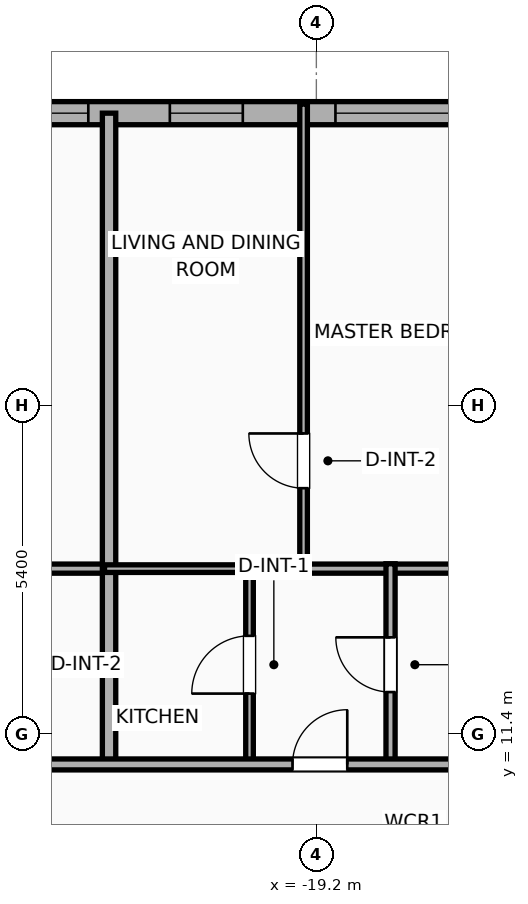
"""IFC4 building model, lengths in metres.
Left out: names, types, materials, properties, quantities, classifications, styles, units other than length and angle.
Written with IfcOpenShell. Run it as: python <this file> out.ifc"""

import sys

from ifc_helpers import new_model, si_unit, direction, frame, frame_2d, origin, place, context, subcontext, project, spatial, rectangle, extrude, element, fill, save


model = new_model("IFC4")
c1 = context("Model", 3, precision=1e-05, world=origin(), true_north=direction((0.0, 1.0)))
c2 = subcontext(c1, "Body", "Model", "MODEL_VIEW")
j1 = project(units=[si_unit("LENGTHUNIT", "METRE"), si_unit("PLANEANGLEUNIT", "RADIAN")], contexts=[c1])
p1 = place(None, origin())
s1 = spatial("IfcSite", under=j1, at=p1, CompositionType="ELEMENT")
p2 = place(p1, origin())
s2 = spatial("IfcBuilding", under=s1, at=p2, CompositionType="ELEMENT")
p3 = place(p2, frame((0.0, 0.0, 89.7)))
s3 = spatial("IfcBuildingStorey", under=s2, at=p3, CompositionType="ELEMENT", Elevation=89.7)
p4 = place(p3, frame((-25.381, 21.61, 0.0), z_axis=(0.0, 0.0, 1.0), x_axis=(1.0, 0.0, 0.0)))
e1 = element("IfcWall", 1, at=p4, inside=s3, PredefinedType="ELEMENTEDWALL", context=c2, shape_type="SweptSolid", body=[
    extrude(rectangle(XDim=54.763, YDim=0.38, at=frame_2d((27.381, 0.0))), origin(), (0.0, 0.0, 1.0), 2.54),
])
p5 = place(p4, frame((6.495, 0.0, 0.75)))
e2 = element("IfcOpeningElement", 2, at=p5, cuts=e1, PredefinedType="OPENING", context=c2, shape_type="SweptSolid", body=[
    extrude(rectangle(XDim=2.4, YDim=1.63, at=frame_2d((1.2, 0.815))), frame((0.0, 0.2, 0.0), z_axis=(0.0, -1.0, 0.0), x_axis=(1.0, 0.0, 0.0)), (0.0, 0.0, 1.0), 0.4),
])
p6 = place(p4, frame((48.367, 0.0, 0.75)))
e3 = element("IfcOpeningElement", 3, at=p6, cuts=e1, PredefinedType="OPENING", context=c2, shape_type="SweptSolid", body=[
    extrude(rectangle(XDim=2.4, YDim=1.63, at=frame_2d((1.2, 0.815))), frame((0.0, 0.2, 0.0), z_axis=(0.0, -1.0, 0.0), x_axis=(1.0, 0.0, 0.0)), (0.0, 0.0, 1.0), 0.4),
])
p7 = place(p4, frame((1.231, 0.0, 0.75)))
e4 = element("IfcOpeningElement", 4, at=p7, cuts=e1, PredefinedType="OPENING", context=c2, shape_type="SweptSolid", body=[
    extrude(rectangle(XDim=1.2, YDim=1.63, at=frame_2d((0.6, 0.815))), frame((0.0, 0.2, 0.0), z_axis=(0.0, -1.0, 0.0), x_axis=(1.0, 0.0, 0.0)), (0.0, 0.0, 1.0), 0.4),
])
p8 = place(p4, frame((3.772, 0.0, 0.75)))
e5 = element("IfcOpeningElement", 5, at=p8, cuts=e1, PredefinedType="OPENING", context=c2, shape_type="SweptSolid", body=[
    extrude(rectangle(XDim=1.2, YDim=1.63, at=frame_2d((0.6, 0.815))), frame((0.0, 0.2, 0.0), z_axis=(0.0, -1.0, 0.0), x_axis=(1.0, 0.0, 0.0)), (0.0, 0.0, 1.0), 0.4),
])
p9 = place(p4, frame((12.031, 0.0, 0.75)))
e6 = element("IfcOpeningElement", 6, at=p9, cuts=e1, PredefinedType="OPENING", context=c2, shape_type="SweptSolid", body=[
    extrude(rectangle(XDim=1.2, YDim=1.63, at=frame_2d((0.6, 0.815))), frame((0.0, 0.2, 0.0), z_axis=(0.0, -1.0, 0.0), x_axis=(1.0, 0.0, 0.0)), (0.0, 0.0, 1.0), 0.4),
])
p10 = place(p4, frame((19.805, 0.0, 0.75)))
e7 = element("IfcOpeningElement", 7, at=p10, cuts=e1, PredefinedType="OPENING", context=c2, shape_type="SweptSolid", body=[
    extrude(rectangle(XDim=1.2, YDim=1.63, at=frame_2d((0.6, 0.815))), frame((0.0, 0.2, 0.0), z_axis=(0.0, -1.0, 0.0), x_axis=(1.0, 0.0, 0.0)), (0.0, 0.0, 1.0), 0.4),
])
p11 = place(p4, frame((16.555, 0.0, 0.75)))
e8 = element("IfcOpeningElement", 8, at=p11, cuts=e1, PredefinedType="OPENING", context=c2, shape_type="SweptSolid", body=[
    extrude(rectangle(XDim=1.2, YDim=1.63, at=frame_2d((0.6, 0.815))), frame((0.0, 0.2, 0.0), z_axis=(0.0, -1.0, 0.0), x_axis=(1.0, 0.0, 0.0)), (0.0, 0.0, 1.0), 0.4),
])
p12 = place(p4, frame((23.866, 0.0, 0.75)))
e9 = element("IfcOpeningElement", 9, at=p12, cuts=e1, PredefinedType="OPENING", context=c2, shape_type="SweptSolid", body=[
    extrude(rectangle(XDim=1.2, YDim=1.63, at=frame_2d((0.6, 0.815))), frame((0.0, 0.2, 0.0), z_axis=(0.0, -1.0, 0.0), x_axis=(1.0, 0.0, 0.0)), (0.0, 0.0, 1.0), 0.4),
])
p13 = place(p4, frame((27.116, 0.0, 0.75)))
e10 = element("IfcOpeningElement", 10, at=p13, cuts=e1, PredefinedType="OPENING", context=c2, shape_type="SweptSolid", body=[
    extrude(rectangle(XDim=1.2, YDim=1.63, at=frame_2d((0.6, 0.815))), frame((0.0, 0.2, 0.0), z_axis=(0.0, -1.0, 0.0), x_axis=(1.0, 0.0, 0.0)), (0.0, 0.0, 1.0), 0.4),
])
p14 = place(p4, frame((30.931, 0.0, 0.75)))
e11 = element("IfcOpeningElement", 11, at=p14, cuts=e1, PredefinedType="OPENING", context=c2, shape_type="SweptSolid", body=[
    extrude(rectangle(XDim=1.2, YDim=1.63, at=frame_2d((0.6, 0.815))), frame((0.0, 0.2, 0.0), z_axis=(0.0, -1.0, 0.0), x_axis=(1.0, 0.0, 0.0)), (0.0, 0.0, 1.0), 0.4),
])
p15 = place(p4, frame((36.733, 0.0, 0.75)))
e12 = element("IfcOpeningElement", 12, at=p15, cuts=e1, PredefinedType="OPENING", context=c2, shape_type="SweptSolid", body=[
    extrude(rectangle(XDim=1.2, YDim=1.63, at=frame_2d((0.6, 0.815))), frame((0.0, 0.2, 0.0), z_axis=(0.0, -1.0, 0.0), x_axis=(1.0, 0.0, 0.0)), (0.0, 0.0, 1.0), 0.4),
])
p16 = place(p4, frame((39.858, 0.0, 0.75)))
e13 = element("IfcOpeningElement", 13, at=p16, cuts=e1, PredefinedType="OPENING", context=c2, shape_type="SweptSolid", body=[
    extrude(rectangle(XDim=1.2, YDim=1.63, at=frame_2d((0.6, 0.815))), frame((0.0, 0.2, 0.0), z_axis=(0.0, -1.0, 0.0), x_axis=(1.0, 0.0, 0.0)), (0.0, 0.0, 1.0), 0.4),
])
p17 = place(p4, frame((44.636, 0.0, 0.75)))
e14 = element("IfcOpeningElement", 14, at=p17, cuts=e1, PredefinedType="OPENING", context=c2, shape_type="SweptSolid", body=[
    extrude(rectangle(XDim=1.2, YDim=1.63, at=frame_2d((0.6, 0.815))), frame((0.0, 0.2, 0.0), z_axis=(0.0, -1.0, 0.0), x_axis=(1.0, 0.0, 0.0)), (0.0, 0.0, 1.0), 0.4),
])
p18 = place(p4, frame((51.809, 0.0, 0.75)))
e15 = element("IfcOpeningElement", 15, at=p18, cuts=e1, PredefinedType="OPENING", context=c2, shape_type="SweptSolid", body=[
    extrude(rectangle(XDim=1.2, YDim=1.63, at=frame_2d((0.6, 0.815))), frame((0.0, 0.2, 0.0), z_axis=(0.0, -1.0, 0.0), x_axis=(1.0, 0.0, 0.0)), (0.0, 0.0, 1.0), 0.4),
])
p19 = place(p3, frame((-26.139, 14.12, 0.0), z_axis=(0.0, 0.0, 1.0), x_axis=(1.0, 0.0, 0.0)))
e16 = element("IfcWall", 16, at=p19, inside=s3, PredefinedType="PLUMBINGWALL", context=c2, shape_type="SweptSolid", body=[
    extrude(rectangle(XDim=3.605, YDim=0.15, at=frame_2d((1.802, 0.0))), origin(), (0.0, 0.0, 1.0), 3.65),
])
p20 = place(p3, frame((-22.609, 10.82, 0.0), z_axis=(0.0, 0.0, 1.0), x_axis=(0.0, 1.0, 0.0)))
e17 = element("IfcWall", 17, at=p20, inside=s3, PredefinedType="PARTITIONING", context=c2, shape_type="SweptSolid", body=[
    extrude(rectangle(XDim=10.79, YDim=0.22, at=frame_2d((5.395, 0.0))), origin(), (0.0, 0.0, 1.0), 3.65),
])
p21 = place(p3, frame((-19.41, 14.04, 0.0), z_axis=(0.0, 0.0, 1.0), x_axis=(0.0, 1.0, 0.0)))
e18 = element("IfcWall", 18, at=p21, inside=s3, PredefinedType="PARTITIONING", context=c2, shape_type="SweptSolid", body=[
    extrude(rectangle(XDim=7.72, YDim=0.125, at=frame_2d((3.86, 0.0))), origin(), (0.0, 0.0, 1.0), 3.65),
])
p22 = place(p21, frame((1.403, 0.0, 0.0)))
e19 = element("IfcOpeningElement", 19, at=p22, cuts=e18, PredefinedType="OPENING", context=c2, shape_type="SweptSolid", body=[
    extrude(rectangle(XDim=0.9, YDim=2.05, at=frame_2d((0.45, 1.025))), frame((0.0, 0.073, 0.0), z_axis=(0.0, -1.0, 0.0), x_axis=(1.0, 0.0, 0.0)), (0.0, 0.0, 1.0), 0.145),
])
p23 = place(p3, frame((-19.53, 14.12, 0.0), z_axis=(0.0, 0.0, 1.0), x_axis=(1.0, 0.0, 0.0)))
e20 = element("IfcWall", 20, at=p23, inside=s3, PredefinedType="PLUMBINGWALL", context=c2, shape_type="SweptSolid", body=[
    extrude(rectangle(XDim=3.79, YDim=0.15, at=frame_2d((1.895, 0.0))), origin(), (0.0, 0.0, 1.0), 3.65),
])
p24 = place(p3, frame((-20.299, 10.88, 0.0), z_axis=(0.0, 0.0, 1.0), x_axis=(0.0, 1.0, 0.0)))
e21 = element("IfcWall", 21, at=p24, inside=s3, PredefinedType="PARTITIONING", context=c2, shape_type="SweptSolid", body=[
    extrude(rectangle(XDim=3.32, YDim=0.125, at=frame_2d((1.66, 0.0))), origin(), (0.0, 0.0, 1.0), 3.65),
])
p25 = place(p24, frame((1.185, 0.0, 0.0)))
e22 = element("IfcOpeningElement", 22, at=p25, cuts=e21, PredefinedType="OPENING", context=c2, shape_type="SweptSolid", body=[
    extrude(rectangle(XDim=0.95, YDim=2.05, at=frame_2d((0.475, 1.025))), frame((0.0, 0.073, 0.0), z_axis=(0.0, -1.0, 0.0), x_axis=(1.0, 0.0, 0.0)), (0.0, 0.0, 1.0), 0.145),
])
p26 = place(p3, frame((-22.684, 14.12, 0.0), z_axis=(0.0, 0.0, 1.0), x_axis=(1.0, 0.0, 0.0)))
e23 = element("IfcWall", 23, at=p26, inside=s3, PredefinedType="PARTITIONING", context=c2, shape_type="SweptSolid", body=[
    extrude(rectangle(XDim=2.505, YDim=0.125, at=frame_2d((1.252, 0.0))), origin(), (0.0, 0.0, 1.0), 3.65),
])
p27 = place(p3, frame((-17.98, 10.88, 0.0), z_axis=(0.0, 0.0, 1.0), x_axis=(0.0, 1.0, 0.0)))
e24 = element("IfcWall", 24, at=p27, inside=s3, PredefinedType="PLUMBINGWALL", context=c2, shape_type="SweptSolid", body=[
    extrude(rectangle(XDim=3.32, YDim=0.15, at=frame_2d((1.66, 0.0))), origin(), (0.0, 0.0, 1.0), 3.65),
])
p28 = place(p27, frame((1.21, 0.0, 0.0)))
e25 = element("IfcOpeningElement", 25, at=p28, cuts=e24, PredefinedType="OPENING", context=c2, shape_type="SweptSolid", body=[
    extrude(rectangle(XDim=0.9, YDim=2.05, at=frame_2d((0.45, 1.025))), frame((0.0, 0.085, 0.0), z_axis=(0.0, -1.0, 0.0), x_axis=(1.0, 0.0, 0.0)), (0.0, 0.0, 1.0), 0.17),
])
p29 = place(p3, frame((-29.21, 10.9, 0.0), z_axis=(0.0, 0.0, 1.0), x_axis=(1.0, 0.0, 0.0)))
e26 = element("IfcWall", 26, at=p29, inside=s3, PredefinedType="PARTITIONING", context=c2, shape_type="SweptSolid", body=[
    extrude(rectangle(XDim=62.42, YDim=0.18, at=frame_2d((31.21, 0.0))), origin(), (0.0, 0.0, 1.0), 3.65),
])
p30 = place(p29, frame((2.983, 0.0, 0.0)))
e27 = element("IfcOpeningElement", 27, at=p30, cuts=e26, PredefinedType="OPENING", context=c2, shape_type="SweptSolid", body=[
    extrude(rectangle(XDim=0.9, YDim=2.05, at=frame_2d((0.45, 1.025))), frame((0.0, 0.1, 0.0), z_axis=(0.0, -1.0, 0.0), x_axis=(1.0, 0.0, 0.0)), (0.0, 0.0, 1.0), 0.2),
])
p31 = place(p29, frame((9.618, 0.0, 0.0)))
e28 = element("IfcOpeningElement", 28, at=p31, cuts=e26, PredefinedType="OPENING", context=c2, shape_type="SweptSolid", body=[
    extrude(rectangle(XDim=0.9, YDim=2.05, at=frame_2d((0.45, 1.025))), frame((0.0, 0.1, 0.0), z_axis=(0.0, -1.0, 0.0), x_axis=(1.0, 0.0, 0.0)), (0.0, 0.0, 1.0), 0.2),
])
p32 = place(p29, frame((16.135, 0.0, 0.0)))
e29 = element("IfcOpeningElement", 29, at=p32, cuts=e26, PredefinedType="OPENING", context=c2, shape_type="SweptSolid", body=[
    extrude(rectangle(XDim=0.9, YDim=2.05, at=frame_2d((0.45, 1.025))), frame((0.0, 0.1, 0.0), z_axis=(0.0, -1.0, 0.0), x_axis=(1.0, 0.0, 0.0)), (0.0, 0.0, 1.0), 0.2),
])
p33 = place(p29, frame((23.632, 0.0, 0.0)))
e30 = element("IfcOpeningElement", 30, at=p33, cuts=e26, PredefinedType="OPENING", context=c2, shape_type="SweptSolid", body=[
    extrude(rectangle(XDim=1.15, YDim=2.05, at=frame_2d((0.575, 1.025))), frame((0.0, 0.1, 0.0), z_axis=(0.0, -1.0, 0.0), x_axis=(1.0, 0.0, 0.0)), (0.0, 0.0, 1.0), 0.2),
])
p34 = place(p29, frame((27.751, 0.0, 0.0)))
e31 = element("IfcOpeningElement", 31, at=p34, cuts=e26, PredefinedType="OPENING", context=c2, shape_type="SweptSolid", body=[
    extrude(rectangle(XDim=1.15, YDim=2.05, at=frame_2d((0.575, 1.025))), frame((0.0, 0.1, 0.0), z_axis=(0.0, -1.0, 0.0), x_axis=(1.0, 0.0, 0.0)), (0.0, 0.0, 1.0), 0.2),
])
p35 = place(p29, frame((35.635, 0.0, 0.0)))
e32 = element("IfcOpeningElement", 32, at=p35, cuts=e26, PredefinedType="OPENING", context=c2, shape_type="SweptSolid", body=[
    extrude(rectangle(XDim=0.9, YDim=2.05, at=frame_2d((0.45, 1.025))), frame((0.0, 0.1, 0.0), z_axis=(0.0, -1.0, 0.0), x_axis=(1.0, 0.0, 0.0)), (0.0, 0.0, 1.0), 0.2),
])
p36 = place(p29, frame((40.616, 0.0, 0.0)))
e33 = element("IfcOpeningElement", 33, at=p36, cuts=e26, PredefinedType="OPENING", context=c2, shape_type="SweptSolid", body=[
    extrude(rectangle(XDim=1.15, YDim=2.05, at=frame_2d((0.575, 1.025))), frame((0.0, 0.1, 0.0), z_axis=(0.0, -1.0, 0.0), x_axis=(1.0, 0.0, 0.0)), (0.0, 0.0, 1.0), 0.2),
])
p37 = place(p29, frame((48.256, 0.0, 0.0)))
e34 = element("IfcOpeningElement", 34, at=p37, cuts=e26, PredefinedType="OPENING", context=c2, shape_type="SweptSolid", body=[
    extrude(rectangle(XDim=0.9, YDim=2.05, at=frame_2d((0.45, 1.025))), frame((0.0, 0.1, 0.0), z_axis=(0.0, -1.0, 0.0), x_axis=(1.0, 0.0, 0.0)), (0.0, 0.0, 1.0), 0.2),
])
p38 = place(p29, frame((57.032, 0.0, 0.0)))
e35 = element("IfcOpeningElement", 35, at=p38, cuts=e26, PredefinedType="OPENING", context=c2, shape_type="SweptSolid", body=[
    extrude(rectangle(XDim=1.15, YDim=2.05, at=frame_2d((0.575, 1.025))), frame((0.0, 0.1, 0.0), z_axis=(0.0, -1.0, 0.0), x_axis=(1.0, 0.0, 0.0)), (0.0, 0.0, 1.0), 0.2),
])
p39 = place(p5, origin())
e36 = element("IfcWindow", 36, at=p39, inside=s3, PartitioningType="SINGLE_PANEL", PredefinedType="WINDOW", context=c2, shape_type="SweptSolid", body=[
    extrude(rectangle(XDim=2.4, YDim=1.63, at=frame_2d((1.2, 0.815))), frame((0.0, 0.03, 0.0), z_axis=(0.0, -1.0, 0.0), x_axis=(1.0, 0.0, 0.0)), (0.0, 0.0, 1.0), 0.06),
])
fill(e2, e36)
p40 = place(p7, origin())
e37 = element("IfcWindow", 37, at=p40, inside=s3, PartitioningType="SINGLE_PANEL", PredefinedType="WINDOW", context=c2, shape_type="SweptSolid", body=[
    extrude(rectangle(XDim=1.2, YDim=1.63, at=frame_2d((0.6, 0.815))), frame((0.0, 0.03, 0.0), z_axis=(0.0, -1.0, 0.0), x_axis=(1.0, 0.0, 0.0)), (0.0, 0.0, 1.0), 0.06),
])
fill(e4, e37)
p41 = place(p8, origin())
e38 = element("IfcWindow", 38, at=p41, inside=s3, PartitioningType="SINGLE_PANEL", PredefinedType="WINDOW", context=c2, shape_type="SweptSolid", body=[
    extrude(rectangle(XDim=1.2, YDim=1.63, at=frame_2d((0.6, 0.815))), frame((0.0, 0.03, 0.0), z_axis=(0.0, -1.0, 0.0), x_axis=(1.0, 0.0, 0.0)), (0.0, 0.0, 1.0), 0.06),
])
fill(e5, e38)
p42 = place(p22, origin())
e39 = element("IfcDoor", 39, at=p42, inside=s3, OperationType="SINGLE_SWING_RIGHT", PredefinedType="DOOR", context=c2, shape_type="SweptSolid", body=[
    extrude(rectangle(XDim=0.9, YDim=2.05, at=frame_2d((0.45, 1.025))), frame((0.0, 0.025, 0.0), z_axis=(0.0, -1.0, 0.0), x_axis=(1.0, 0.0, 0.0)), (0.0, 0.0, 1.0), 0.05),
])
fill(e19, e39)
p43 = place(p25, origin())
e40 = element("IfcDoor", 40, at=p43, inside=s3, OperationType="SINGLE_SWING_LEFT", PredefinedType="DOOR", context=c2, shape_type="SweptSolid", body=[
    extrude(rectangle(XDim=0.95, YDim=2.05, at=frame_2d((0.475, 1.025))), frame((0.0, 0.025, 0.0), z_axis=(0.0, -1.0, 0.0), x_axis=(1.0, 0.0, 0.0)), (0.0, 0.0, 1.0), 0.05),
])
fill(e22, e40)
p44 = place(p28, origin())
e41 = element("IfcDoor", 41, at=p44, inside=s3, OperationType="SINGLE_SWING_RIGHT", PredefinedType="DOOR", context=c2, shape_type="SweptSolid", body=[
    extrude(rectangle(XDim=0.9, YDim=2.05, at=frame_2d((0.45, 1.025))), frame((0.0, 0.025, 0.0), z_axis=(0.0, -1.0, 0.0), x_axis=(1.0, 0.0, 0.0)), (0.0, 0.0, 1.0), 0.05),
])
fill(e25, e41)
p45 = place(p31, origin())
e42 = element("IfcDoor", 42, at=p45, inside=s3, OperationType="SINGLE_SWING_RIGHT", PredefinedType="DOOR", context=c2, shape_type="SweptSolid", body=[
    extrude(rectangle(XDim=0.9, YDim=2.05, at=frame_2d((0.45, 1.025))), frame((0.0, 0.025, 0.0), z_axis=(0.0, -1.0, 0.0), x_axis=(1.0, 0.0, 0.0)), (0.0, 0.0, 1.0), 0.05),
])
fill(e28, e42)
save(model, sys.argv[1])
